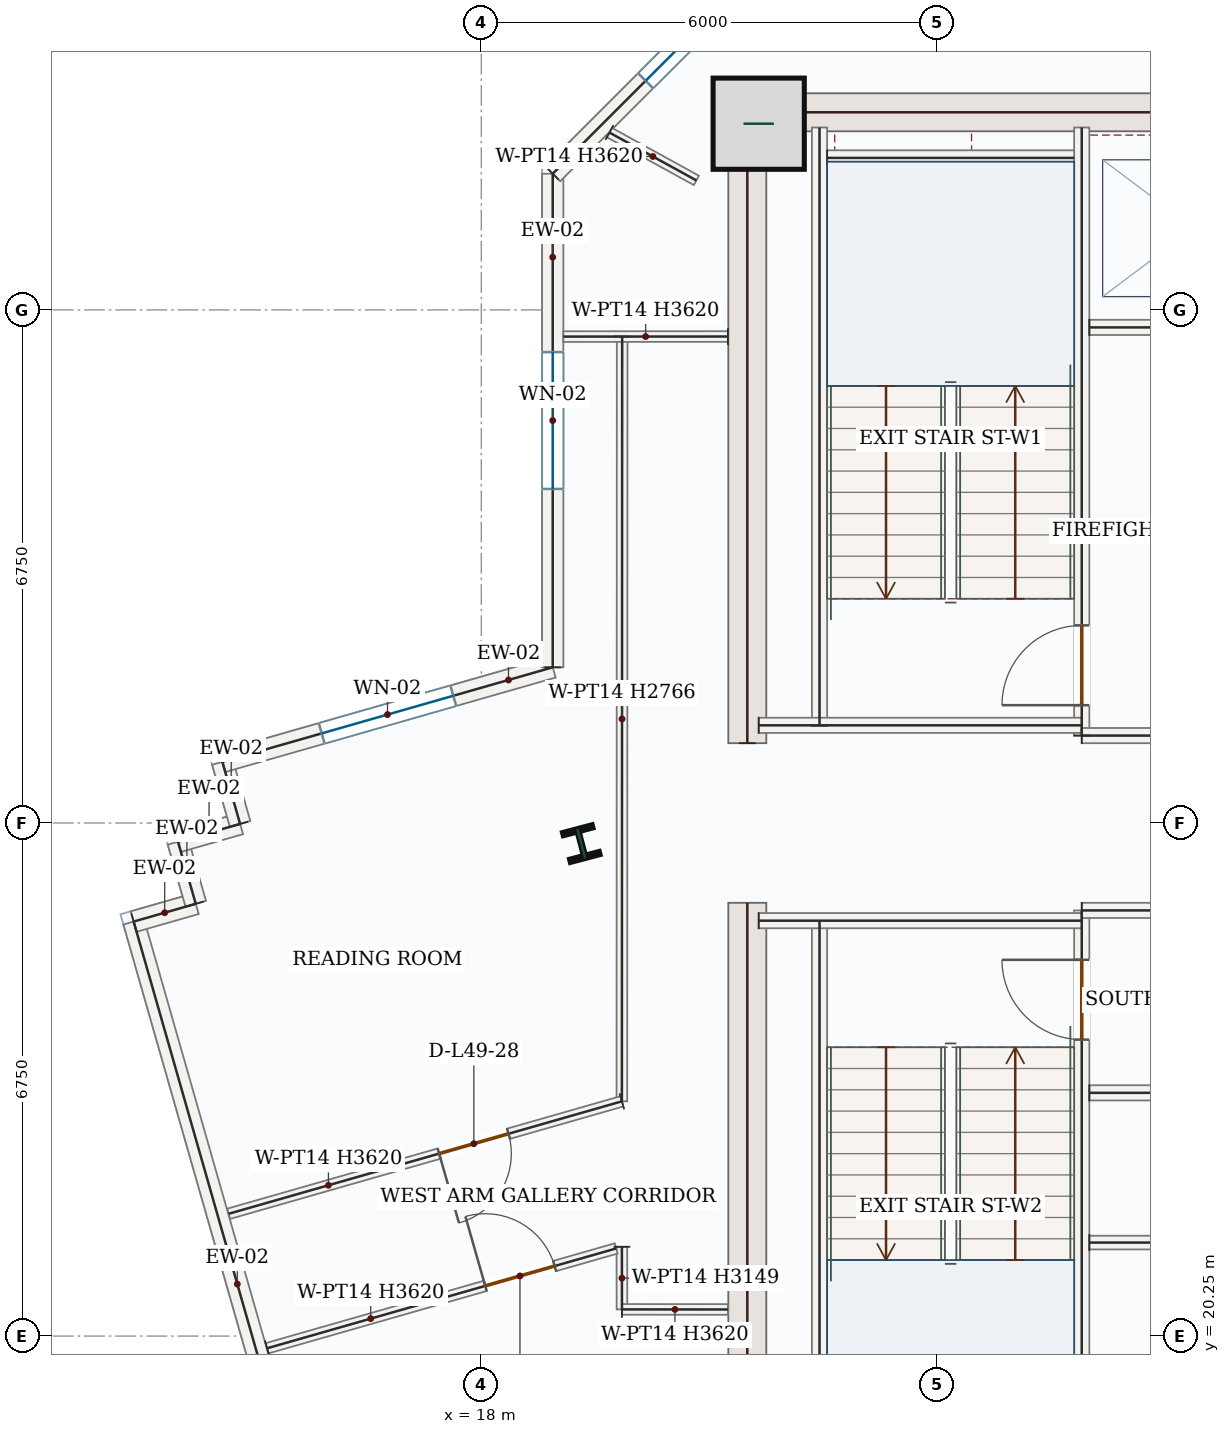
"""IFC4 building model, lengths in metres.
Left out: names, types, materials, properties, quantities, classifications, styles, units other than length and angle.
Written with IfcOpenShell. Run it as: python <this file> out.ifc"""

import sys

from ifc_helpers import new_model, si_unit, direction, frame, frame_2d, origin, origin_2d, place, context, subcontext, project, spatial, rectangle, i_section, extrude, source, transform, mapped, element, fill, save


model = new_model("IFC4")
c1 = context("Model", 3, precision=1e-05, world=origin(), true_north=direction((0.0, 1.0)))
c2 = subcontext(c1, "Body", "Model", "MODEL_VIEW")
j1 = project(units=[si_unit("LENGTHUNIT", "METRE"), si_unit("PLANEANGLEUNIT", "RADIAN")], contexts=[c1])
p1 = place(None, origin())
s1 = spatial("IfcSite", under=j1, at=p1, CompositionType="ELEMENT")
p2 = place(p1, origin())
s2 = spatial("IfcBuilding", under=s1, at=p2, CompositionType="ELEMENT")
p3 = place(p2, frame((0.0, 0.0, 209.7)))
s3 = spatial("IfcBuildingStorey", under=s2, at=p3, CompositionType="ELEMENT", Elevation=209.7)
m1 = source(origin(), c2, "Body", "SweptSolid", [
    extrude(rectangle(XDim=8.55, YDim=0.5, at=frame_2d((4.275, 0.0))), origin(), (0.0, 0.0, 1.0), 3.62),
])
for number, where, z_axis, x_axis in (
    (1, (21.5, 17.4, 0.0), (0.0, 0.0, 1.0), (0.0, 1.0, 0.0)),
    (2, (21.5, 28.05, 0.0), (0.0, 0.0, 1.0), (0.0, 1.0, 0.0)),
):
    element("IfcWall", number, at=place(p3, frame(where, z_axis=z_axis, x_axis=x_axis)), inside=s3, PredefinedType="SHEAR", context=c2, shape_type="MappedRepresentation", body=[
        mapped(m1, transform((0.0, 0.0, 0.0), x_axis=(1.0, 0.0, 0.0), y_axis=(0.0, 1.0, 0.0), z_axis=(0.0, 0.0, 1.0), scale=1.0)),
    ])
m2 = source(origin(), c2, "Body", "SweptSolid", [
    extrude(rectangle(XDim=7.0, YDim=0.5, at=frame_2d((3.5, 0.0))), origin(), (0.0, 0.0, 1.0), 3.62),
])
p4 = place(p3, frame((21.75, 36.35, 0.0), z_axis=(0.0, 0.0, 1.0), x_axis=(1.0, 0.0, 0.0)))
e3 = element("IfcWall", 3, at=p4, inside=s3, PredefinedType="SHEAR", context=c2, shape_type="MappedRepresentation", body=[
    mapped(m2, transform((0.0, 0.0, 0.0), x_axis=(1.0, 0.0, 0.0), y_axis=(0.0, 1.0, 0.0), z_axis=(0.0, 0.0, 1.0), scale=1.0)),
])
m3 = source(origin(), c2, "Body", "SweptSolid", [
    extrude(rectangle(XDim=1.2, YDim=1.2, at=origin_2d()), origin(), (0.0, 0.0, 1.0), 3.9),
])
p5 = place(p3, frame((21.65, 36.2, 0.0), z_axis=(0.0, 0.0, 1.0), x_axis=(1.0, 0.0, 0.0)))
e4 = element("IfcColumn", 4, at=p5, inside=s3, PredefinedType="COLUMN", context=c2, shape_type="MappedRepresentation", body=[
    mapped(m3, transform((0.0, 0.0, 0.0), x_axis=(1.0, 0.0, 0.0), y_axis=(0.0, 1.0, 0.0), z_axis=(0.0, 0.0, 1.0), scale=1.0)),
])
m4 = source(origin(), c2, "Body", "SweptSolid", [
    extrude(i_section(OverallWidth=0.404, OverallDepth=0.407, WebThickness=0.027, FlangeThickness=0.044, FilletRadius=0.018, at=origin_2d()), origin(), (0.0, 0.0, 1.0), 3.9),
])
p6 = place(p3, frame((19.316, 26.729, 0.0), z_axis=(0.0, 0.0, 1.0), x_axis=(0.966823388604, 0.255445757936, 0.0)))
e5 = element("IfcColumn", 5, at=p6, inside=s3, PredefinedType="COLUMN", context=c2, shape_type="MappedRepresentation", body=[
    mapped(m4, transform((0.0, 0.0, 0.0), x_axis=(1.0, 0.0, 0.0), y_axis=(0.0, 1.0, 0.0), z_axis=(0.0, 0.0, 1.0), scale=1.0)),
])
m5 = source(origin(), c2, "Body", "SweptSolid", [
    extrude(rectangle(XDim=9.92, YDim=0.28, at=frame_2d((4.96, 0.0))), origin(), (0.0, 0.0, 1.0), 3.62),
])
p7 = place(p3, frame((16.154, 16.165, 0.0), z_axis=(0.0, 0.0, 1.0), x_axis=(-0.274971401171, 0.961452405758, 0.0)))
e6 = element("IfcWall", 6, at=p7, inside=s3, PredefinedType="SOLIDWALL", context=c2, shape_type="MappedRepresentation", body=[
    mapped(m5, transform((0.0, 0.0, 0.0), x_axis=(1.0, 0.0, 0.0), y_axis=(0.0, 1.0, 0.0), z_axis=(0.0, 0.0, 1.0), scale=1.0)),
])
m6 = source(origin(), c2, "Body", "SweptSolid", [
    extrude(rectangle(XDim=0.85, YDim=0.28, at=frame_2d((0.425, 0.0))), origin(), (0.0, 0.0, 1.0), 3.62),
])
for number, where, z_axis, x_axis in (
    (7, (13.427, 25.703, 0.0), (0.0, 0.0, 1.0), (0.961, 0.275, 0.0)),
    (8, (14.244, 25.937, 0.0), (0.0, 0.0, 1.0), (-0.275, 0.961, 0.0)),
    (9, (14.01, 26.754, 0.0), (0.0, 0.0, 1.0), (0.961, 0.275, 0.0)),
    (10, (14.827, 26.988, 0.0), (0.0, 0.0, 1.0), (-0.275, 0.961, 0.0)),
):
    element("IfcWall", number, at=place(p3, frame(where, z_axis=z_axis, x_axis=x_axis)), inside=s3, PredefinedType="SOLIDWALL", context=c2, shape_type="MappedRepresentation", body=[
        mapped(m6, transform((0.0, 0.0, 0.0), x_axis=(1.0, 0.0, 0.0), y_axis=(0.0, 1.0, 0.0), z_axis=(0.0, 0.0, 1.0), scale=1.0)),
    ])
p8 = place(p3, frame((14.594, 27.805, 0.0), z_axis=(0.0, 0.0, 1.0), x_axis=(0.961446468673, 0.274992159663, 0.0)))
e11 = element("IfcWall", 11, at=p8, inside=s3, PredefinedType="SOLIDWALL", context=c2, shape_type="SweptSolid", body=[
    extrude(rectangle(XDim=4.521, YDim=0.28, at=frame_2d((2.26, 0.0))), origin(), (0.0, 0.0, 1.0), 3.62),
])
p9 = place(p8, frame((1.36, 0.0, 0.85)))
e12 = element("IfcOpeningElement", 12, at=p9, cuts=e11, PredefinedType="OPENING", context=c2, shape_type="SweptSolid", body=[
    extrude(rectangle(XDim=1.8, YDim=1.75, at=frame_2d((0.9, 0.875))), frame((0.0, 0.15, 0.0), z_axis=(0.0, -1.0, 0.0), x_axis=(1.0, 0.0, 0.0)), (0.0, 0.0, 1.0), 0.3),
])
p10 = place(p3, frame((18.94, 29.048, 0.0), z_axis=(0.0, 0.0, 1.0), x_axis=(0.0, 1.0, 0.0)))
e13 = element("IfcWall", 13, at=p10, inside=s3, PredefinedType="SOLIDWALL", context=c2, shape_type="SweptSolid", body=[
    extrude(rectangle(XDim=6.494, YDim=0.28, at=frame_2d((3.247, 0.0))), origin(), (0.0, 0.0, 1.0), 3.62),
])
p11 = place(p10, frame((2.347, 0.0, 0.85)))
e14 = element("IfcOpeningElement", 14, at=p11, cuts=e13, PredefinedType="OPENING", context=c2, shape_type="SweptSolid", body=[
    extrude(rectangle(XDim=1.8, YDim=1.75, at=frame_2d((0.9, 0.875))), frame((0.0, 0.15, 0.0), z_axis=(0.0, -1.0, 0.0), x_axis=(1.0, 0.0, 0.0)), (0.0, 0.0, 1.0), 0.3),
])
p12 = place(p3, frame((18.94, 35.542, 0.0), z_axis=(0.0, 0.0, 1.0), x_axis=(0.707106781187, 0.707106781187, 0.0)))
e15 = element("IfcWall", 15, at=p12, inside=s3, PredefinedType="SOLIDWALL", context=c2, shape_type="SweptSolid", body=[
    extrude(rectangle(XDim=5.258, YDim=0.28, at=frame_2d((2.629, 0.0))), origin(), (0.0, 0.0, 1.0), 3.62),
])
p13 = place(p12, frame((1.729, 0.0, 0.85)))
e16 = element("IfcOpeningElement", 16, at=p13, cuts=e15, PredefinedType="OPENING", context=c2, shape_type="SweptSolid", body=[
    extrude(rectangle(XDim=1.8, YDim=1.75, at=frame_2d((0.9, 0.875))), frame((0.0, 0.15, 0.0), z_axis=(0.0, -1.0, 0.0), x_axis=(1.0, 0.0, 0.0)), (0.0, 0.0, 1.0), 0.3),
])
m7 = source(origin(), c2, "Body", "SweptSolid", [
    extrude(rectangle(XDim=7.87, YDim=0.2, at=frame_2d((3.935, 0.0))), origin(), (0.0, 0.0, 1.0), 3.62),
])
for number, where, z_axis, x_axis in (
    (17, (22.45, 17.85, 0.0), (0.0, 0.0, 1.0), (0.0, 1.0, 0.0)),
    (18, (22.45, 28.28, 0.0), (0.0, 0.0, 1.0), (0.0, 1.0, 0.0)),
):
    element("IfcWall", number, at=place(p3, frame(where, z_axis=z_axis, x_axis=x_axis)), inside=s3, PredefinedType="SOLIDWALL", context=c2, shape_type="MappedRepresentation", body=[
        mapped(m7, transform((0.0, 0.0, 0.0), x_axis=(1.0, 0.0, 0.0), y_axis=(0.0, 1.0, 0.0), z_axis=(0.0, 0.0, 1.0), scale=1.0)),
    ])
p14 = place(p3, frame((25.9, 17.85, 0.0), z_axis=(0.0, 0.0, 1.0), x_axis=(0.0, 1.0, 0.0)))
e19 = element("IfcWall", 19, at=p14, inside=s3, PredefinedType="SOLIDWALL", context=c2, shape_type="SweptSolid", body=[
    extrude(rectangle(XDim=8.0, YDim=0.2, at=frame_2d((4.0, 0.0))), origin(), (0.0, 0.0, 1.0), 3.62),
])
p15 = place(p14, frame((6.3, 0.0, 0.0)))
e20 = element("IfcOpeningElement", 20, at=p15, cuts=e19, PredefinedType="OPENING", context=c2, shape_type="SweptSolid", body=[
    extrude(rectangle(XDim=1.05, YDim=2.15, at=frame_2d((0.525, 1.075))), frame((0.0, 0.11, 0.0), z_axis=(0.0, -1.0, 0.0), x_axis=(1.0, 0.0, 0.0)), (0.0, 0.0, 1.0), 0.22),
])
p16 = place(p3, frame((25.9, 28.15, 0.0), z_axis=(0.0, 0.0, 1.0), x_axis=(0.0, 1.0, 0.0)))
e21 = element("IfcWall", 21, at=p16, inside=s3, PredefinedType="SOLIDWALL", context=c2, shape_type="SweptSolid", body=[
    extrude(rectangle(XDim=8.0, YDim=0.2, at=frame_2d((4.0, 0.0))), origin(), (0.0, 0.0, 1.0), 3.62),
])
p17 = place(p16, frame((0.4, 0.0, 0.0)))
e22 = element("IfcOpeningElement", 22, at=p17, cuts=e21, PredefinedType="OPENING", context=c2, shape_type="SweptSolid", body=[
    extrude(rectangle(XDim=1.05, YDim=2.15, at=frame_2d((0.525, 1.075))), frame((0.0, 0.11, 0.0), z_axis=(0.0, -1.0, 0.0), x_axis=(1.0, 0.0, 0.0)), (0.0, 0.0, 1.0), 0.22),
])
m8 = source(origin(), c2, "Body", "SweptSolid", [
    extrude(rectangle(XDim=4.25, YDim=0.2, at=frame_2d((2.125, 0.0))), origin(), (0.0, 0.0, 1.0), 3.62),
])
p18 = place(p3, frame((21.65, 25.715, 0.0), z_axis=(0.0, 0.0, 1.0), x_axis=(1.0, 0.0, 0.0)))
e23 = element("IfcWall", 23, at=p18, inside=s3, PredefinedType="SOLIDWALL", context=c2, shape_type="MappedRepresentation", body=[
    mapped(m8, transform((0.0, 0.0, 0.0), x_axis=(1.0, 0.0, 0.0), y_axis=(0.0, 1.0, 0.0), z_axis=(0.0, 0.0, 1.0), scale=1.0)),
])
m9 = source(origin(), c2, "Body", "SweptSolid", [
    extrude(rectangle(XDim=3.0, YDim=0.2, at=frame_2d((1.5, 0.0))), origin(), (0.0, 0.0, 1.0), 3.62),
])
p19 = place(p3, frame((25.9, 25.85, 0.0), z_axis=(0.0, 0.0, 1.0), x_axis=(1.0, 0.0, 0.0)))
e24 = element("IfcWall", 24, at=p19, inside=s3, PredefinedType="SOLIDWALL", context=c2, shape_type="MappedRepresentation", body=[
    mapped(m9, transform((0.0, 0.0, 0.0), x_axis=(1.0, 0.0, 0.0), y_axis=(0.0, 1.0, 0.0), z_axis=(0.0, 0.0, 1.0), scale=1.0)),
])
p20 = place(p3, frame((21.65, 28.285, 0.0), z_axis=(0.0, 0.0, 1.0), x_axis=(1.0, 0.0, 0.0)))
e25 = element("IfcWall", 25, at=p20, inside=s3, PredefinedType="SOLIDWALL", context=c2, shape_type="MappedRepresentation", body=[
    mapped(m8, transform((0.0, 0.0, 0.0), x_axis=(1.0, 0.0, 0.0), y_axis=(0.0, 1.0, 0.0), z_axis=(0.0, 0.0, 1.0), scale=1.0)),
])
p21 = place(p3, frame((25.9, 28.15, 0.0), z_axis=(0.0, 0.0, 1.0), x_axis=(1.0, 0.0, 0.0)))
e26 = element("IfcWall", 26, at=p21, inside=s3, PredefinedType="SOLIDWALL", context=c2, shape_type="MappedRepresentation", body=[
    mapped(m9, transform((0.0, 0.0, 0.0), x_axis=(1.0, 0.0, 0.0), y_axis=(0.0, 1.0, 0.0), z_axis=(0.0, 0.0, 1.0), scale=1.0)),
])
m10 = source(origin(), c2, "Body", "SweptSolid", [
    extrude(rectangle(XDim=3.25, YDim=0.2, at=frame_2d((1.625, 0.0))), origin(), (0.0, 0.0, 1.0), 3.62),
])
p22 = place(p3, frame((22.55, 35.75, 0.0), z_axis=(0.0, 0.0, 1.0), x_axis=(1.0, 0.0, 0.0)))
e27 = element("IfcWall", 27, at=p22, inside=s3, PredefinedType="SOLIDWALL", context=c2, shape_type="MappedRepresentation", body=[
    mapped(m10, transform((0.0, 0.0, 0.0), x_axis=(1.0, 0.0, 0.0), y_axis=(0.0, 1.0, 0.0), z_axis=(0.0, 0.0, 1.0), scale=1.0)),
])
p23 = place(p3, frame((26.0, 33.52, 0.0), z_axis=(0.0, 0.0, 1.0), x_axis=(1.0, 0.0, 0.0)))
e28 = element("IfcWall", 28, at=p23, inside=s3, PredefinedType="SOLIDWALL", context=c2, shape_type="SweptSolid", body=[
    extrude(rectangle(XDim=2.75, YDim=0.2, at=frame_2d((1.375, 0.0))), origin(), (0.0, 0.0, 1.0), 3.62),
])
p24 = place(p23, frame((0.82, 0.0, 0.0)))
e29 = element("IfcOpeningElement", 29, at=p24, cuts=e28, PredefinedType="OPENING", context=c2, shape_type="SweptSolid", body=[
    extrude(rectangle(XDim=1.1, YDim=2.15, at=frame_2d((0.55, 1.075))), frame((0.0, 0.11, 0.0), z_axis=(0.0, -1.0, 0.0), x_axis=(1.0, 0.0, 0.0)), (0.0, 0.0, 1.0), 0.22),
])
m11 = source(origin(), c2, "Body", "SweptSolid", [
    extrude(rectangle(XDim=2.75, YDim=0.2, at=frame_2d((1.375, 0.0))), origin(), (0.0, 0.0, 1.0), 3.62),
])
p25 = place(p3, frame((26.0, 23.45, 0.0), z_axis=(0.0, 0.0, 1.0), x_axis=(1.0, 0.0, 0.0)))
e30 = element("IfcWall", 30, at=p25, inside=s3, PredefinedType="SOLIDWALL", context=c2, shape_type="MappedRepresentation", body=[
    mapped(m11, transform((0.0, 0.0, 0.0), x_axis=(1.0, 0.0, 0.0), y_axis=(0.0, 1.0, 0.0), z_axis=(0.0, 0.0, 1.0), scale=1.0)),
])
m12 = source(origin(), c2, "Body", "SweptSolid", [
    extrude(rectangle(XDim=2.75, YDim=0.18, at=frame_2d((1.375, 0.0))), origin(), (0.0, 0.0, 1.0), 3.62),
])
p26 = place(p3, frame((26.0, 21.48, 0.0), z_axis=(0.0, 0.0, 1.0), x_axis=(1.0, 0.0, 0.0)))
e31 = element("IfcWall", 31, at=p26, inside=s3, PredefinedType="PARTITIONING", context=c2, shape_type="MappedRepresentation", body=[
    mapped(m12, transform((0.0, 0.0, 0.0), x_axis=(1.0, 0.0, 0.0), y_axis=(0.0, 1.0, 0.0), z_axis=(0.0, 0.0, 1.0), scale=1.0)),
])
m13 = source(origin(), c2, "Body", "SweptSolid", [
    extrude(rectangle(XDim=10.061, YDim=0.14, at=frame_2d((5.031, 0.0))), origin(), (0.0, 0.0, 1.0), 2.766),
])
p27 = place(p3, frame((19.854, 33.399, 0.0), z_axis=(0.0, 0.0, 1.0), x_axis=(-0.000363980467, -0.999999933759, 0.0)))
e32 = element("IfcWall", 32, at=p27, inside=s3, PredefinedType="PARTITIONING", context=c2, shape_type="MappedRepresentation", body=[
    mapped(m13, transform((0.0, 0.0, 0.0), x_axis=(1.0, 0.0, 0.0), y_axis=(0.0, 1.0, 0.0), z_axis=(0.0, 0.0, 1.0), scale=1.0)),
])
p28 = place(p3, frame((19.85, 23.338, 0.0), z_axis=(0.0, 0.0, 1.0), x_axis=(-0.961455430103, -0.274960826164, 0.0)))
e33 = element("IfcWall", 33, at=p28, inside=s3, PredefinedType="PARTITIONING", context=c2, shape_type="SweptSolid", body=[
    extrude(rectangle(XDim=5.381, YDim=0.14, at=frame_2d((2.69, 0.0))), origin(), (0.0, 0.0, 1.0), 3.62),
])
p29 = place(p28, frame((1.551, 0.0, 0.0)))
e34 = element("IfcOpeningElement", 34, at=p29, cuts=e33, PredefinedType="OPENING", context=c2, shape_type="SweptSolid", body=[
    extrude(rectangle(XDim=0.95, YDim=2.15, at=frame_2d((0.475, 1.075))), frame((0.0, 0.08, 0.0), z_axis=(0.0, -1.0, 0.0), x_axis=(1.0, 0.0, 0.0)), (0.0, 0.0, 1.0), 0.16),
])
m14 = source(origin(), c2, "Body", "SweptSolid", [
    extrude(rectangle(XDim=1.305, YDim=0.14, at=frame_2d((0.653, 0.0))), origin(), (0.0, 0.0, 1.0), 3.62),
])
p30 = place(p3, frame((19.686, 36.083, 0.0), z_axis=(0.0, 0.0, 1.0), x_axis=(0.876117183384, -0.48209820678, 0.0)))
e35 = element("IfcWall", 35, at=p30, inside=s3, PredefinedType="PARTITIONING", context=c2, shape_type="MappedRepresentation", body=[
    mapped(m14, transform((0.0, 0.0, 0.0), x_axis=(1.0, 0.0, 0.0), y_axis=(0.0, 1.0, 0.0), z_axis=(0.0, 0.0, 1.0), scale=1.0)),
])
m15 = source(origin(), c2, "Body", "SweptSolid", [
    extrude(rectangle(XDim=2.165, YDim=0.14, at=frame_2d((1.083, 0.0))), origin(), (0.0, 0.0, 1.0), 3.62),
])
p31 = place(p3, frame((21.245, 33.4, 0.0), z_axis=(0.0, 0.0, 1.0), x_axis=(-0.999999942778, -0.000338294974, 0.0)))
e36 = element("IfcWall", 36, at=p31, inside=s3, PredefinedType="PARTITIONING", context=c2, shape_type="MappedRepresentation", body=[
    mapped(m15, transform((0.0, 0.0, 0.0), x_axis=(1.0, 0.0, 0.0), y_axis=(0.0, 1.0, 0.0), z_axis=(0.0, 0.0, 1.0), scale=1.0)),
])
m16 = source(origin(), c2, "Body", "SweptSolid", [
    extrude(rectangle(XDim=0.823, YDim=0.14, at=frame_2d((0.412, 0.0))), origin(), (0.0, 0.0, 1.0), 3.149),
])
p32 = place(p3, frame((19.85, 21.424, 0.0), z_axis=(0.0, 0.0, 1.0), x_axis=(0.001186238786, -0.999999296419, 0.0)))
e37 = element("IfcWall", 37, at=p32, inside=s3, PredefinedType="PARTITIONING", context=c2, shape_type="MappedRepresentation", body=[
    mapped(m16, transform((0.0, 0.0, 0.0), x_axis=(1.0, 0.0, 0.0), y_axis=(0.0, 1.0, 0.0), z_axis=(0.0, 0.0, 1.0), scale=1.0)),
])
m17 = source(origin(), c2, "Body", "SweptSolid", [
    extrude(rectangle(XDim=1.394, YDim=0.14, at=frame_2d((0.697, 0.0))), origin(), (0.0, 0.0, 1.0), 3.62),
])
p33 = place(p3, frame((19.851, 20.601, 0.0), z_axis=(0.0, 0.0, 1.0), x_axis=(0.999999754632, -0.000700525222, 0.0)))
e38 = element("IfcWall", 38, at=p33, inside=s3, PredefinedType="PARTITIONING", context=c2, shape_type="MappedRepresentation", body=[
    mapped(m17, transform((0.0, 0.0, 0.0), x_axis=(1.0, 0.0, 0.0), y_axis=(0.0, 1.0, 0.0), z_axis=(0.0, 0.0, 1.0), scale=1.0)),
])
p34 = place(p3, frame((15.183, 20.09, 0.0), z_axis=(0.0, 0.0, 1.0), x_axis=(0.961460270043, 0.274943901784, 0.0)))
e39 = element("IfcWall", 39, at=p34, inside=s3, PredefinedType="PARTITIONING", context=c2, shape_type="SweptSolid", body=[
    extrude(rectangle(XDim=4.776, YDim=0.14, at=frame_2d((2.388, 0.0))), origin(), (0.0, 0.0, 1.0), 3.62),
])
p35 = place(p34, frame((2.985, 0.0, 0.0)))
e40 = element("IfcOpeningElement", 40, at=p35, cuts=e39, PredefinedType="OPENING", context=c2, shape_type="SweptSolid", body=[
    extrude(rectangle(XDim=0.95, YDim=2.15, at=frame_2d((0.475, 1.075))), frame((0.0, 0.08, 0.0), z_axis=(0.0, -1.0, 0.0), x_axis=(1.0, 0.0, 0.0)), (0.0, 0.0, 1.0), 0.16),
])
m18 = source(origin(), c2, "Body", "SweptSolid", [
    extrude(rectangle(XDim=1.8, YDim=1.75, at=frame_2d((0.9, 0.875))), frame((0.0, 0.03, 0.0), z_axis=(0.0, -1.0, 0.0), x_axis=(1.0, 0.0, 0.0)), (0.0, 0.0, 1.0), 0.06),
])
p36 = place(p9, origin())
e41 = element("IfcWindow", 41, at=p36, inside=s3, PartitioningType="DOUBLE_PANEL_VERTICAL", PredefinedType="WINDOW", context=c2, shape_type="MappedRepresentation", body=[
    mapped(m18, transform((0.0, 0.0, 0.0), x_axis=(1.0, 0.0, 0.0), y_axis=(0.0, 1.0, 0.0), z_axis=(0.0, 0.0, 1.0), scale=1.0)),
])
fill(e12, e41)
p37 = place(p11, origin())
e42 = element("IfcWindow", 42, at=p37, inside=s3, PartitioningType="DOUBLE_PANEL_VERTICAL", PredefinedType="WINDOW", context=c2, shape_type="MappedRepresentation", body=[
    mapped(m18, transform((0.0, 0.0, 0.0), x_axis=(1.0, 0.0, 0.0), y_axis=(0.0, 1.0, 0.0), z_axis=(0.0, 0.0, 1.0), scale=1.0)),
])
fill(e14, e42)
p38 = place(p13, origin())
e43 = element("IfcWindow", 43, at=p38, inside=s3, PartitioningType="DOUBLE_PANEL_VERTICAL", PredefinedType="WINDOW", context=c2, shape_type="MappedRepresentation", body=[
    mapped(m18, transform((0.0, 0.0, 0.0), x_axis=(1.0, 0.0, 0.0), y_axis=(0.0, 1.0, 0.0), z_axis=(0.0, 0.0, 1.0), scale=1.0)),
])
fill(e16, e43)
m19 = source(origin(), c2, "Body", "SweptSolid", [
    extrude(rectangle(XDim=1.05, YDim=2.15, at=frame_2d((0.525, 1.075))), frame((0.0, 0.025, 0.0), z_axis=(0.0, -1.0, 0.0), x_axis=(1.0, 0.0, 0.0)), (0.0, 0.0, 1.0), 0.05),
])
p39 = place(p17, origin())
e44 = element("IfcDoor", 44, at=p39, inside=s3, OperationType="SINGLE_SWING_LEFT", PredefinedType="DOOR", context=c2, shape_type="MappedRepresentation", body=[
    mapped(m19, transform((0.0, 0.0, 0.0), x_axis=(1.0, 0.0, 0.0), y_axis=(0.0, 1.0, 0.0), z_axis=(0.0, 0.0, 1.0), scale=1.0)),
])
fill(e22, e44)
p40 = place(p15, origin())
e45 = element("IfcDoor", 45, at=p40, inside=s3, OperationType="SINGLE_SWING_RIGHT", PredefinedType="DOOR", context=c2, shape_type="MappedRepresentation", body=[
    mapped(m19, transform((0.0, 0.0, 0.0), x_axis=(1.0, 0.0, 0.0), y_axis=(0.0, 1.0, 0.0), z_axis=(0.0, 0.0, 1.0), scale=1.0)),
])
fill(e20, e45)
m20 = source(origin(), c2, "Body", "SweptSolid", [
    extrude(rectangle(XDim=0.95, YDim=2.15, at=frame_2d((0.475, 1.075))), frame((0.0, 0.025, 0.0), z_axis=(0.0, -1.0, 0.0), x_axis=(1.0, 0.0, 0.0)), (0.0, 0.0, 1.0), 0.05),
])
p41 = place(p29, origin())
e46 = element("IfcDoor", 46, at=p41, inside=s3, OperationType="SINGLE_SWING_RIGHT", PredefinedType="DOOR", context=c2, shape_type="MappedRepresentation", body=[
    mapped(m20, transform((0.0, 0.0, 0.0), x_axis=(1.0, 0.0, 0.0), y_axis=(0.0, 1.0, 0.0), z_axis=(0.0, 0.0, 1.0), scale=1.0)),
])
fill(e34, e46)
p42 = place(p35, origin())
e47 = element("IfcDoor", 47, at=p42, inside=s3, OperationType="SINGLE_SWING_LEFT", PredefinedType="DOOR", context=c2, shape_type="MappedRepresentation", body=[
    mapped(m20, transform((0.0, 0.0, 0.0), x_axis=(1.0, 0.0, 0.0), y_axis=(0.0, 1.0, 0.0), z_axis=(0.0, 0.0, 1.0), scale=1.0)),
])
fill(e40, e47)
save(model, sys.argv[1])
